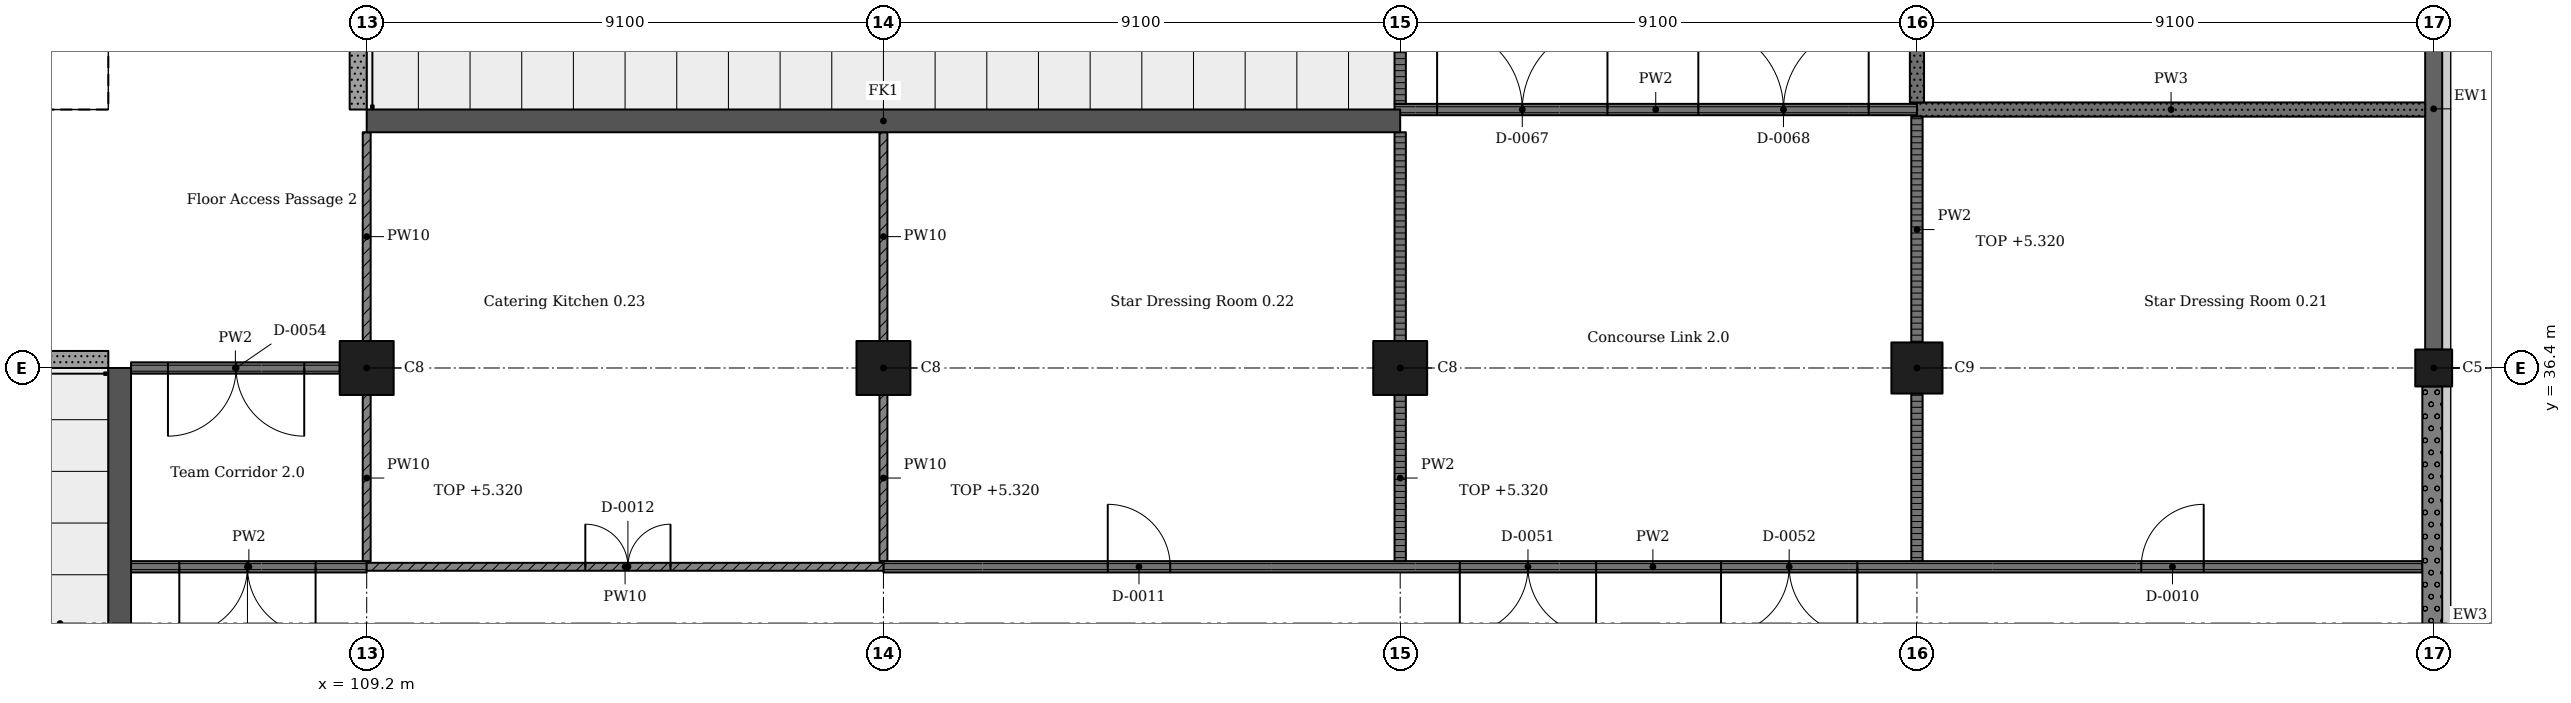
"""IFC4 building model, lengths in metres.
Left out: names, types, materials, properties, quantities, classifications, styles, units other than length and angle.
Written with IfcOpenShell. Run it as: python <this file> out.ifc"""

import sys

from ifc_helpers import new_model, si_unit, direction, frame, frame_2d, origin, origin_2d, place, context, subcontext, project, spatial, rectangle, extrude, element, fill, save


model = new_model("IFC4")
c1 = context("Model", 3, precision=1e-05, world=origin(), true_north=direction((0.0, 1.0)))
c2 = subcontext(c1, "Body", "Model", "MODEL_VIEW")
j1 = project(units=[si_unit("LENGTHUNIT", "METRE"), si_unit("PLANEANGLEUNIT", "RADIAN")], contexts=[c1])
p1 = place(None, origin())
s1 = spatial("IfcSite", under=j1, at=p1, CompositionType="ELEMENT")
p2 = place(p1, origin())
s2 = spatial("IfcBuilding", under=s1, at=p2, CompositionType="ELEMENT")
p3 = place(p2, origin())
s3 = spatial("IfcBuildingStorey", under=s2, at=p3, CompositionType="ELEMENT", Elevation=0.0)
for number, where, z_axis, x_axis in (
    (1, (109.2, 36.4, -0.4), (0.0, 0.0, 1.0), (1.0, 0.0, 0.0)),
    (2, (118.3, 36.4, -0.4), (0.0, 0.0, 1.0), (1.0, 0.0, 0.0)),
    (3, (127.4, 36.4, -0.4), (0.0, 0.0, 1.0), (1.0, 0.0, 0.0)),
):
    element("IfcColumn", number, at=place(p3, frame(where, z_axis=z_axis, x_axis=x_axis)), inside=s3, PredefinedType="COLUMN", context=c2, shape_type="SweptSolid", body=[
        extrude(rectangle(XDim=0.95, YDim=0.95, at=origin_2d()), origin(), (0.0, 0.0, 1.0), 6.77),
    ])
p4 = place(p3, frame((136.5, 36.4, -0.4), z_axis=(0.0, 0.0, 1.0), x_axis=(1.0, 0.0, 0.0)))
e4 = element("IfcColumn", 4, at=p4, inside=s3, PredefinedType="COLUMN", context=c2, shape_type="SweptSolid", body=[
    extrude(rectangle(XDim=0.9, YDim=0.9, at=origin_2d()), origin(), (0.0, 0.0, 1.0), 6.77),
])
p5 = place(p3, frame((145.6, 36.4, -0.4), z_axis=(0.0, 0.0, 1.0), x_axis=(1.0, 0.0, 0.0)))
e5 = element("IfcColumn", 5, at=p5, inside=s3, PredefinedType="COLUMN", context=c2, shape_type="SweptSolid", body=[
    extrude(rectangle(XDim=0.65, YDim=0.65, at=origin_2d()), origin(), (0.0, 0.0, 1.0), 6.77),
])
p6 = place(p3, frame((40.95, 36.55, -0.4), z_axis=(0.0, 0.0, 1.0), x_axis=(1.0, 0.0, 0.0)))
e6 = element("IfcWall", 6, at=p6, inside=s3, PredefinedType="SOLIDWALL", context=c2, shape_type="SweptSolid", body=[
    extrude(rectangle(XDim=63.7, YDim=0.3, at=frame_2d((31.85, 0.0))), origin(), (0.0, 0.0, 1.0), 1.45),
])
p7 = place(p3, frame((109.05, 40.95, -0.4), z_axis=(0.0, 0.0, 1.0), x_axis=(0.0, 1.0, 0.0)))
e7 = element("IfcWall", 7, at=p7, inside=s3, PredefinedType="SOLIDWALL", context=c2, shape_type="SweptSolid", body=[
    extrude(rectangle(XDim=27.3, YDim=0.3, at=frame_2d((13.65, 0.0))), origin(), (0.0, 0.0, 1.0), 1.45),
])
for number, where, z_axis, x_axis in (
    (8, (104.85, 36.4, -0.4), (0.0, 0.0, 1.0), (0.0, -1.0, 0.0)),
    (9, (109.2, 40.75, -0.4), (0.0, 0.0, 1.0), (1.0, 0.0, 0.0)),
):
    element("IfcWall", number, at=place(p3, frame(where, z_axis=z_axis, x_axis=x_axis)), inside=s3, PredefinedType="SHEAR", context=c2, shape_type="SweptSolid", body=[
        extrude(rectangle(XDim=18.2, YDim=0.4, at=frame_2d((9.1, 0.0))), origin(), (0.0, 0.0, 1.0), 6.77),
    ])
p8 = place(p3, frame((145.575, 27.55, 0.0), z_axis=(0.0, 0.0, 1.0), x_axis=(0.0, 1.0, 0.0)))
e10 = element("IfcWall", 10, at=p8, inside=s3, PredefinedType="SOLIDWALL", context=c2, shape_type="SweptSolid", body=[
    extrude(rectangle(XDim=8.525, YDim=0.35, at=frame_2d((4.262, 0.0))), origin(), (0.0, 0.0, 1.0), 5.27),
])
p9 = place(p3, frame((145.6, 36.725, 0.0), z_axis=(0.0, 0.0, 1.0), x_axis=(0.0, 1.0, 0.0)))
e11 = element("IfcWall", 11, at=p9, inside=s3, PredefinedType="SOLIDWALL", context=c2, shape_type="SweptSolid", body=[
    extrude(rectangle(XDim=8.475, YDim=0.3, at=frame_2d((4.237, 0.0))), origin(), (0.0, 0.0, 1.0), 5.27),
])
p10 = place(p3, frame((105.05, 32.9, 0.0), z_axis=(0.0, 0.0, 1.0), x_axis=(1.0, 0.0, 0.0)))
e12 = element("IfcWall", 12, at=p10, inside=s3, PredefinedType="PARTITIONING", context=c2, shape_type="SweptSolid", body=[
    extrude(rectangle(XDim=4.15, YDim=0.2, at=frame_2d((2.075, 0.0))), origin(), (0.0, 0.0, 1.0), 6.02),
])
p11 = place(p10, frame((0.85, 0.0, 0.0)))
e13 = element("IfcOpeningElement", 13, at=p11, cuts=e12, PredefinedType="OPENING", context=c2, shape_type="SweptSolid", body=[
    extrude(rectangle(XDim=2.4, YDim=2.4, at=frame_2d((1.2, 1.2))), frame((0.0, 0.11, 0.0), z_axis=(0.0, -1.0, 0.0), x_axis=(1.0, 0.0, 0.0)), (0.0, 0.0, 1.0), 0.22),
])
p12 = place(p3, frame((105.05, 36.4, 0.0), z_axis=(0.0, 0.0, 1.0), x_axis=(1.0, 0.0, 0.0)))
e14 = element("IfcWall", 14, at=p12, inside=s3, PredefinedType="PARTITIONING", context=c2, shape_type="SweptSolid", body=[
    extrude(rectangle(XDim=3.675, YDim=0.2, at=frame_2d((1.837, 0.0))), origin(), (0.0, 0.0, 1.0), 6.02),
])
p13 = place(p12, frame((0.65, 0.0, 0.0)))
e15 = element("IfcOpeningElement", 15, at=p13, cuts=e14, PredefinedType="OPENING", context=c2, shape_type="SweptSolid", body=[
    extrude(rectangle(XDim=2.4, YDim=2.4, at=frame_2d((1.2, 1.2))), frame((0.0, 0.11, 0.0), z_axis=(0.0, -1.0, 0.0), x_axis=(1.0, 0.0, 0.0)), (0.0, 0.0, 1.0), 0.22),
])
p14 = place(p3, frame((109.2, 33.0, 0.0), z_axis=(0.0, 0.0, 1.0), x_axis=(0.0, 1.0, 0.0)))
e16 = element("IfcWall", 16, at=p14, inside=s3, PredefinedType="SOLIDWALL", context=c2, shape_type="SweptSolid", body=[
    extrude(rectangle(XDim=2.925, YDim=0.14, at=frame_2d((1.462, 0.0))), origin(), (0.0, 0.0, 1.0), 5.32),
])
p15 = place(p3, frame((109.2, 36.875, 0.0), z_axis=(0.0, 0.0, 1.0), x_axis=(0.0, 1.0, 0.0)))
e17 = element("IfcWall", 17, at=p15, inside=s3, PredefinedType="SOLIDWALL", context=c2, shape_type="SweptSolid", body=[
    extrude(rectangle(XDim=3.675, YDim=0.14, at=frame_2d((1.837, 0.0))), origin(), (0.0, 0.0, 1.0), 6.02),
])
p16 = place(p3, frame((118.3, 32.9, 0.0), z_axis=(0.0, 0.0, 1.0), x_axis=(-1.0, 0.0, 0.0)))
e18 = element("IfcWall", 18, at=p16, inside=s3, PredefinedType="SOLIDWALL", context=c2, shape_type="SweptSolid", body=[
    extrude(rectangle(XDim=9.1, YDim=0.14, at=frame_2d((4.55, 0.0))), origin(), (0.0, 0.0, 1.0), 6.02),
])
p17 = place(p16, frame((3.75, 0.0, 0.0)))
e19 = element("IfcOpeningElement", 19, at=p17, cuts=e18, PredefinedType="OPENING", context=c2, shape_type="SweptSolid", body=[
    extrude(rectangle(XDim=1.5, YDim=2.1, at=frame_2d((0.75, 1.05))), frame((0.0, 0.08, 0.0), z_axis=(0.0, -1.0, 0.0), x_axis=(1.0, 0.0, 0.0)), (0.0, 0.0, 1.0), 0.16),
])
p18 = place(p3, frame((118.3, 33.0, 0.0), z_axis=(0.0, 0.0, 1.0), x_axis=(0.0, 1.0, 0.0)))
e20 = element("IfcWall", 20, at=p18, inside=s3, PredefinedType="SOLIDWALL", context=c2, shape_type="SweptSolid", body=[
    extrude(rectangle(XDim=2.925, YDim=0.14, at=frame_2d((1.462, 0.0))), origin(), (0.0, 0.0, 1.0), 5.32),
])
p19 = place(p3, frame((118.3, 36.875, 0.0), z_axis=(0.0, 0.0, 1.0), x_axis=(0.0, 1.0, 0.0)))
e21 = element("IfcWall", 21, at=p19, inside=s3, PredefinedType="SOLIDWALL", context=c2, shape_type="SweptSolid", body=[
    extrude(rectangle(XDim=3.675, YDim=0.14, at=frame_2d((1.837, 0.0))), origin(), (0.0, 0.0, 1.0), 6.02),
])
p20 = place(p3, frame((127.3, 40.95, 0.0), z_axis=(0.0, 0.0, 1.0), x_axis=(1.0, 0.0, 0.0)))
e22 = element("IfcWall", 22, at=p20, inside=s3, PredefinedType="PARTITIONING", context=c2, shape_type="SweptSolid", body=[
    extrude(rectangle(XDim=9.2, YDim=0.2, at=frame_2d((4.6, 0.0))), origin(), (0.0, 0.0, 1.0), 6.02),
])
p21 = place(p20, frame((0.75, 0.0, 0.0)))
e23 = element("IfcOpeningElement", 23, at=p21, cuts=e22, PredefinedType="OPENING", context=c2, shape_type="SweptSolid", body=[
    extrude(rectangle(XDim=3.0, YDim=2.4, at=frame_2d((1.5, 1.2))), frame((0.0, 0.11, 0.0), z_axis=(0.0, -1.0, 0.0), x_axis=(1.0, 0.0, 0.0)), (0.0, 0.0, 1.0), 0.22),
])
p22 = place(p20, frame((5.35, 0.0, 0.0)))
e24 = element("IfcOpeningElement", 24, at=p22, cuts=e22, PredefinedType="OPENING", context=c2, shape_type="SweptSolid", body=[
    extrude(rectangle(XDim=3.0, YDim=2.4, at=frame_2d((1.5, 1.2))), frame((0.0, 0.11, 0.0), z_axis=(0.0, -1.0, 0.0), x_axis=(1.0, 0.0, 0.0)), (0.0, 0.0, 1.0), 0.22),
])
p23 = place(p3, frame((118.3, 32.9, 0.0), z_axis=(0.0, 0.0, 1.0), x_axis=(1.0, 0.0, 0.0)))
e25 = element("IfcWall", 25, at=p23, inside=s3, PredefinedType="PARTITIONING", context=c2, shape_type="SweptSolid", body=[
    extrude(rectangle(XDim=27.1, YDim=0.2, at=frame_2d((13.55, 0.0))), origin(), (0.0, 0.0, 1.0), 6.02),
])
p24 = place(p23, frame((22.15, 0.0, 0.0)))
e26 = element("IfcOpeningElement", 26, at=p24, cuts=e25, PredefinedType="OPENING", context=c2, shape_type="SweptSolid", body=[
    extrude(rectangle(XDim=1.1, YDim=2.1, at=frame_2d((0.55, 1.05))), frame((0.0, 0.11, 0.0), z_axis=(0.0, -1.0, 0.0), x_axis=(1.0, 0.0, 0.0)), (0.0, 0.0, 1.0), 0.22),
])
p25 = place(p23, frame((3.95, 0.0, 0.0)))
e27 = element("IfcOpeningElement", 27, at=p25, cuts=e25, PredefinedType="OPENING", context=c2, shape_type="SweptSolid", body=[
    extrude(rectangle(XDim=1.1, YDim=2.1, at=frame_2d((0.55, 1.05))), frame((0.0, 0.11, 0.0), z_axis=(0.0, -1.0, 0.0), x_axis=(1.0, 0.0, 0.0)), (0.0, 0.0, 1.0), 0.22),
])
p26 = place(p23, frame((10.15, 0.0, 0.0)))
e28 = element("IfcOpeningElement", 28, at=p26, cuts=e25, PredefinedType="OPENING", context=c2, shape_type="SweptSolid", body=[
    extrude(rectangle(XDim=2.4, YDim=2.4, at=frame_2d((1.2, 1.2))), frame((0.0, 0.11, 0.0), z_axis=(0.0, -1.0, 0.0), x_axis=(1.0, 0.0, 0.0)), (0.0, 0.0, 1.0), 0.22),
])
p27 = place(p23, frame((14.75, 0.0, 0.0)))
e29 = element("IfcOpeningElement", 29, at=p27, cuts=e25, PredefinedType="OPENING", context=c2, shape_type="SweptSolid", body=[
    extrude(rectangle(XDim=2.4, YDim=2.4, at=frame_2d((1.2, 1.2))), frame((0.0, 0.11, 0.0), z_axis=(0.0, -1.0, 0.0), x_axis=(1.0, 0.0, 0.0)), (0.0, 0.0, 1.0), 0.22),
])
p28 = place(p3, frame((127.4, 35.925, 0.0), z_axis=(0.0, 0.0, 1.0), x_axis=(0.0, -1.0, 0.0)))
e30 = element("IfcWall", 30, at=p28, inside=s3, PredefinedType="PARTITIONING", context=c2, shape_type="SweptSolid", body=[
    extrude(rectangle(XDim=2.925, YDim=0.2, at=frame_2d((1.462, 0.0))), origin(), (0.0, 0.0, 1.0), 5.32),
])
p29 = place(p3, frame((127.4, 40.55, 0.0), z_axis=(0.0, 0.0, 1.0), x_axis=(0.0, -1.0, 0.0)))
e31 = element("IfcWall", 31, at=p29, inside=s3, PredefinedType="PARTITIONING", context=c2, shape_type="SweptSolid", body=[
    extrude(rectangle(XDim=3.675, YDim=0.2, at=frame_2d((1.837, 0.0))), origin(), (0.0, 0.0, 1.0), 5.02),
])
p30 = place(p3, frame((127.4, 41.05, 0.0), z_axis=(0.0, 0.0, 1.0), x_axis=(0.0, 1.0, 0.0)))
e32 = element("IfcWall", 32, at=p30, inside=s3, PredefinedType="PARTITIONING", context=c2, shape_type="SweptSolid", body=[
    extrude(rectangle(XDim=4.45, YDim=0.2, at=frame_2d((2.225, 0.0))), origin(), (0.0, 0.0, 1.0), 5.02),
])
p31 = place(p3, frame((136.5, 33.0, 0.0), z_axis=(0.0, 0.0, 1.0), x_axis=(0.0, 1.0, 0.0)))
e33 = element("IfcWall", 33, at=p31, inside=s3, PredefinedType="PARTITIONING", context=c2, shape_type="SweptSolid", body=[
    extrude(rectangle(XDim=2.95, YDim=0.2, at=frame_2d((1.475, 0.0))), origin(), (0.0, 0.0, 1.0), 5.32),
])
p32 = place(p3, frame((136.5, 36.85, 0.0), z_axis=(0.0, 0.0, 1.0), x_axis=(0.0, 1.0, 0.0)))
e34 = element("IfcWall", 34, at=p32, inside=s3, PredefinedType="PARTITIONING", context=c2, shape_type="SweptSolid", body=[
    extrude(rectangle(XDim=3.975, YDim=0.2, at=frame_2d((1.987, 0.0))), origin(), (0.0, 0.0, 1.0), 5.32),
])
p33 = place(p3, frame((136.5, 40.95, 0.0), z_axis=(0.0, 0.0, 1.0), x_axis=(1.0, 0.0, 0.0)))
e35 = element("IfcWall", 35, at=p33, inside=s3, PredefinedType="SOLIDWALL", context=c2, shape_type="SweptSolid", body=[
    extrude(rectangle(XDim=8.95, YDim=0.25, at=frame_2d((4.475, 0.0))), origin(), (0.0, 0.0, 1.0), 6.02),
])
p34 = place(p3, frame((136.5, 45.075, 0.0), z_axis=(0.0, 0.0, 1.0), x_axis=(0.0, -1.0, 0.0)))
e36 = element("IfcWall", 36, at=p34, inside=s3, PredefinedType="SOLIDWALL", context=c2, shape_type="SweptSolid", body=[
    extrude(rectangle(XDim=4.0, YDim=0.25, at=frame_2d((2.0, 0.0))), origin(), (0.0, 0.0, 1.0), 5.32),
])
p35 = place(p34, frame((1.55, 0.0, 0.0)))
e37 = element("IfcOpeningElement", 37, at=p35, cuts=e36, PredefinedType="OPENING", context=c2, shape_type="SweptSolid", body=[
    extrude(rectangle(XDim=0.8, YDim=2.1, at=frame_2d((0.4, 1.05))), frame((0.0, 0.135, 0.0), z_axis=(0.0, -1.0, 0.0), x_axis=(1.0, 0.0, 0.0)), (0.0, 0.0, 1.0), 0.27),
])
p36 = place(p24, origin())
e38 = element("IfcDoor", 38, at=p36, inside=s3, OperationType="SINGLE_SWING_LEFT", PredefinedType="DOOR", context=c2, shape_type="SweptSolid", body=[
    extrude(rectangle(XDim=1.1, YDim=2.1, at=frame_2d((0.55, 1.05))), frame((0.0, 0.025, 0.0), z_axis=(0.0, -1.0, 0.0), x_axis=(1.0, 0.0, 0.0)), (0.0, 0.0, 1.0), 0.05),
])
fill(e26, e38)
p37 = place(p25, origin())
e39 = element("IfcDoor", 39, at=p37, inside=s3, OperationType="SINGLE_SWING_RIGHT", PredefinedType="DOOR", context=c2, shape_type="SweptSolid", body=[
    extrude(rectangle(XDim=1.1, YDim=2.1, at=frame_2d((0.55, 1.05))), frame((0.0, 0.025, 0.0), z_axis=(0.0, -1.0, 0.0), x_axis=(1.0, 0.0, 0.0)), (0.0, 0.0, 1.0), 0.05),
])
fill(e27, e39)
p38 = place(p17, origin())
e40 = element("IfcDoor", 40, at=p38, inside=s3, OperationType="DOUBLE_DOOR_SINGLE_SWING", PredefinedType="DOOR", context=c2, shape_type="SweptSolid", body=[
    extrude(rectangle(XDim=1.5, YDim=2.1, at=frame_2d((0.75, 1.05))), frame((0.0, 0.025, 0.0), z_axis=(0.0, -1.0, 0.0), x_axis=(1.0, 0.0, 0.0)), (0.0, 0.0, 1.0), 0.05),
])
fill(e19, e40)
p39 = place(p26, origin())
e41 = element("IfcDoor", 41, at=p39, inside=s3, OperationType="DOUBLE_DOOR_SINGLE_SWING", PredefinedType="DOOR", context=c2, shape_type="SweptSolid", body=[
    extrude(rectangle(XDim=2.4, YDim=2.4, at=frame_2d((1.2, 1.2))), frame((0.0, 0.025, 0.0), z_axis=(0.0, -1.0, 0.0), x_axis=(1.0, 0.0, 0.0)), (0.0, 0.0, 1.0), 0.05),
])
fill(e28, e41)
p40 = place(p27, origin())
e42 = element("IfcDoor", 42, at=p40, inside=s3, OperationType="DOUBLE_DOOR_SINGLE_SWING", PredefinedType="DOOR", context=c2, shape_type="SweptSolid", body=[
    extrude(rectangle(XDim=2.4, YDim=2.4, at=frame_2d((1.2, 1.2))), frame((0.0, 0.025, 0.0), z_axis=(0.0, -1.0, 0.0), x_axis=(1.0, 0.0, 0.0)), (0.0, 0.0, 1.0), 0.05),
])
fill(e29, e42)
p41 = place(p11, origin())
e43 = element("IfcDoor", 43, at=p41, inside=s3, OperationType="DOUBLE_DOOR_SINGLE_SWING", PredefinedType="DOOR", context=c2, shape_type="SweptSolid", body=[
    extrude(rectangle(XDim=2.4, YDim=2.4, at=frame_2d((1.2, 1.2))), frame((0.0, 0.025, 0.0), z_axis=(0.0, -1.0, 0.0), x_axis=(1.0, 0.0, 0.0)), (0.0, 0.0, 1.0), 0.05),
])
fill(e13, e43)
p42 = place(p13, origin())
e44 = element("IfcDoor", 44, at=p42, inside=s3, OperationType="DOUBLE_DOOR_SINGLE_SWING", PredefinedType="DOOR", context=c2, shape_type="SweptSolid", body=[
    extrude(rectangle(XDim=2.4, YDim=2.4, at=frame_2d((1.2, 1.2))), frame((0.0, 0.025, 0.0), z_axis=(0.0, -1.0, 0.0), x_axis=(1.0, 0.0, 0.0)), (0.0, 0.0, 1.0), 0.05),
])
fill(e15, e44)
p43 = place(p21, origin())
e45 = element("IfcDoor", 45, at=p43, inside=s3, OperationType="DOUBLE_DOOR_SINGLE_SWING", PredefinedType="DOOR", context=c2, shape_type="SweptSolid", body=[
    extrude(rectangle(XDim=3.0, YDim=2.4, at=frame_2d((1.5, 1.2))), frame((0.0, 0.025, 0.0), z_axis=(0.0, -1.0, 0.0), x_axis=(1.0, 0.0, 0.0)), (0.0, 0.0, 1.0), 0.05),
])
fill(e23, e45)
p44 = place(p22, origin())
e46 = element("IfcDoor", 46, at=p44, inside=s3, OperationType="DOUBLE_DOOR_SINGLE_SWING", PredefinedType="DOOR", context=c2, shape_type="SweptSolid", body=[
    extrude(rectangle(XDim=3.0, YDim=2.4, at=frame_2d((1.5, 1.2))), frame((0.0, 0.025, 0.0), z_axis=(0.0, -1.0, 0.0), x_axis=(1.0, 0.0, 0.0)), (0.0, 0.0, 1.0), 0.05),
])
fill(e24, e46)
save(model, sys.argv[1])
